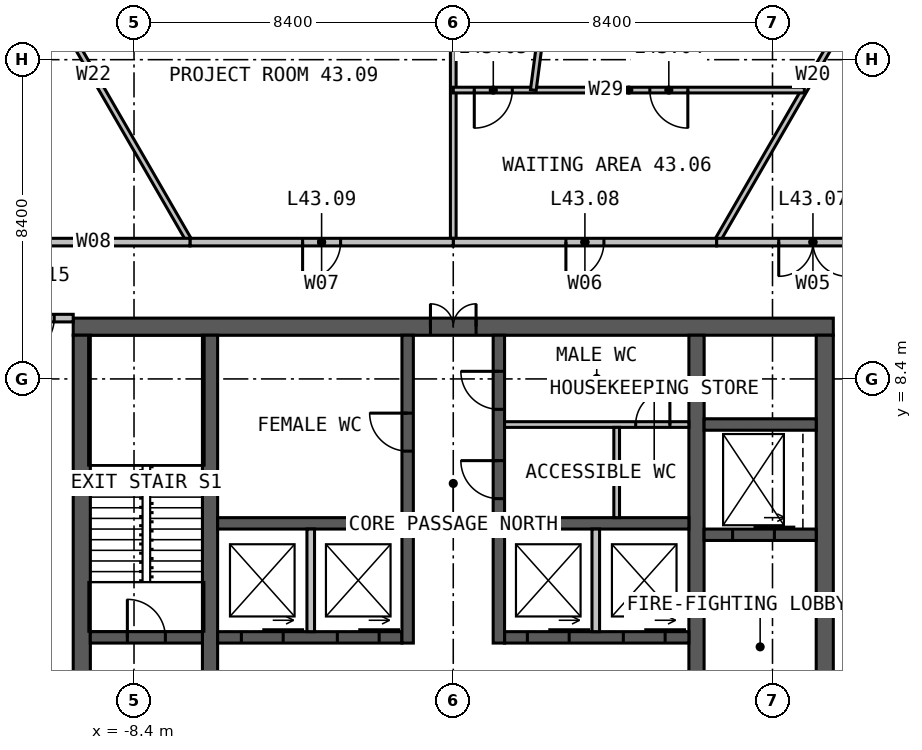
"""IFC4 building model, lengths in metres.
Left out: names, types, materials, properties, quantities, classifications, styles, units other than length and angle.
Written with IfcOpenShell. Run it as: python <this file> out.ifc"""

import sys

from ifc_helpers import new_model, si_unit, direction, frame, frame_2d, origin, place, context, subcontext, project, spatial, rectangle, extrude, element, fill, save


model = new_model("IFC4")
c1 = context("Model", 3, precision=1e-05, world=origin(), true_north=direction((0.0, 1.0)))
c2 = subcontext(c1, "Body", "Model", "MODEL_VIEW")
j1 = project(units=[si_unit("LENGTHUNIT", "METRE"), si_unit("PLANEANGLEUNIT", "RADIAN")], contexts=[c1])
p1 = place(None, origin())
s1 = spatial("IfcSite", under=j1, at=p1, CompositionType="ELEMENT")
p2 = place(p1, origin())
s2 = spatial("IfcBuilding", under=s1, at=p2, CompositionType="ELEMENT")
p3 = place(p2, frame((0.0, 0.0, 179.0)))
s3 = spatial("IfcBuildingStorey", under=s2, at=p3, CompositionType="ELEMENT", Elevation=179.0)
p4 = place(p3, frame((-10.0, 9.775, 0.0), z_axis=(0.0, 0.0, 1.0), x_axis=(1.0, 0.0, 0.0)))
e1 = element("IfcWall", 1, at=p4, inside=s3, PredefinedType="SOLIDWALL", context=c2, shape_type="SweptSolid", body=[
    extrude(rectangle(XDim=20.0, YDim=0.45, at=frame_2d((10.0, 0.0))), origin(), (0.0, 0.0, 1.0), 4.0),
])
p5 = place(p4, frame((9.4, 0.0, 0.0)))
e2 = element("IfcOpeningElement", 2, at=p5, cuts=e1, PredefinedType="OPENING", context=c2, shape_type="SweptSolid", body=[
    extrude(rectangle(XDim=1.2, YDim=2.2, at=frame_2d((0.6, 1.1))), frame((0.0, 0.235, 0.0), z_axis=(0.0, -1.0, 0.0), x_axis=(1.0, 0.0, 0.0)), (0.0, 0.0, 1.0), 0.47),
])
for number, where, z_axis, x_axis in (
    (3, (9.775, -9.55, 0.0), (0.0, 0.0, 1.0), (0.0, 1.0, 0.0)),
    (4, (-9.775, 9.55, 0.0), (0.0, 0.0, 1.0), (0.0, -1.0, 0.0)),
):
    element("IfcWall", number, at=place(p3, frame(where, z_axis=z_axis, x_axis=x_axis)), inside=s3, PredefinedType="SOLIDWALL", context=c2, shape_type="SweptSolid", body=[
        extrude(rectangle(XDim=19.1, YDim=0.45, at=frame_2d((9.55, 0.0))), origin(), (0.0, 0.0, 1.0), 4.0),
    ])
p6 = place(p3, frame((-6.4, -9.55, 0.0), z_axis=(0.0, 0.0, 1.0), x_axis=(0.0, 1.0, 0.0)))
e5 = element("IfcWall", 5, at=p6, inside=s3, PredefinedType="SOLIDWALL", context=c2, shape_type="SweptSolid", body=[
    extrude(rectangle(XDim=19.1, YDim=0.4, at=frame_2d((9.55, 0.0))), origin(), (0.0, 0.0, 1.0), 4.0),
])
p7 = place(p6, frame((9.05, 0.0, 0.0)))
e6 = element("IfcOpeningElement", 6, at=p7, cuts=e5, PredefinedType="OPENING", context=c2, shape_type="SweptSolid", body=[
    extrude(rectangle(XDim=1.0, YDim=2.2, at=frame_2d((0.5, 1.1))), frame((0.0, 0.21, 0.0), z_axis=(0.0, -1.0, 0.0), x_axis=(1.0, 0.0, 0.0)), (0.0, 0.0, 1.0), 0.42),
])
p8 = place(p3, frame((6.4, 9.55, 0.0), z_axis=(0.0, 0.0, 1.0), x_axis=(0.0, -1.0, 0.0)))
e7 = element("IfcWall", 7, at=p8, inside=s3, PredefinedType="SOLIDWALL", context=c2, shape_type="SweptSolid", body=[
    extrude(rectangle(XDim=19.1, YDim=0.4, at=frame_2d((9.55, 0.0))), origin(), (0.0, 0.0, 1.0), 4.0),
])
p9 = place(p8, frame((9.05, 0.0, 0.0)))
e8 = element("IfcOpeningElement", 8, at=p9, cuts=e7, PredefinedType="OPENING", context=c2, shape_type="SweptSolid", body=[
    extrude(rectangle(XDim=1.0, YDim=2.2, at=frame_2d((0.5, 1.1))), frame((0.0, 0.21, 0.0), z_axis=(0.0, -1.0, 0.0), x_axis=(1.0, 0.0, 0.0)), (0.0, 0.0, 1.0), 0.42),
])
p10 = place(p3, frame((-6.2, 1.6, 0.0), z_axis=(0.0, 0.0, 1.0), x_axis=(1.0, 0.0, 0.0)))
e9 = element("IfcWall", 9, at=p10, inside=s3, PredefinedType="SOLIDWALL", context=c2, shape_type="SweptSolid", body=[
    extrude(rectangle(XDim=4.85, YDim=0.3, at=frame_2d((2.425, 0.0))), origin(), (0.0, 0.0, 1.0), 4.0),
])
p11 = place(p10, frame((0.625, 0.0, 0.0)))
e10 = element("IfcOpeningElement", 10, at=p11, cuts=e9, PredefinedType="OPENING", context=c2, shape_type="SweptSolid", body=[
    extrude(rectangle(XDim=1.1, YDim=2.2, at=frame_2d((0.55, 1.1))), frame((0.0, 0.16, 0.0), z_axis=(0.0, -1.0, 0.0), x_axis=(1.0, 0.0, 0.0)), (0.0, 0.0, 1.0), 0.32),
])
p12 = place(p10, frame((3.15, 0.0, 0.0)))
e11 = element("IfcOpeningElement", 11, at=p12, cuts=e9, PredefinedType="OPENING", context=c2, shape_type="SweptSolid", body=[
    extrude(rectangle(XDim=1.1, YDim=2.2, at=frame_2d((0.55, 1.1))), frame((0.0, 0.16, 0.0), z_axis=(0.0, -1.0, 0.0), x_axis=(1.0, 0.0, 0.0)), (0.0, 0.0, 1.0), 0.32),
])
p13 = place(p3, frame((1.35, 1.6, 0.0), z_axis=(0.0, 0.0, 1.0), x_axis=(1.0, 0.0, 0.0)))
e12 = element("IfcWall", 12, at=p13, inside=s3, PredefinedType="SOLIDWALL", context=c2, shape_type="SweptSolid", body=[
    extrude(rectangle(XDim=4.85, YDim=0.3, at=frame_2d((2.425, 0.0))), origin(), (0.0, 0.0, 1.0), 4.0),
])
p14 = place(p13, frame((0.6, 0.0, 0.0)))
e13 = element("IfcOpeningElement", 13, at=p14, cuts=e12, PredefinedType="OPENING", context=c2, shape_type="SweptSolid", body=[
    extrude(rectangle(XDim=1.1, YDim=2.2, at=frame_2d((0.55, 1.1))), frame((0.0, 0.16, 0.0), z_axis=(0.0, -1.0, 0.0), x_axis=(1.0, 0.0, 0.0)), (0.0, 0.0, 1.0), 0.32),
])
p15 = place(p13, frame((3.125, 0.0, 0.0)))
e14 = element("IfcOpeningElement", 14, at=p15, cuts=e12, PredefinedType="OPENING", context=c2, shape_type="SweptSolid", body=[
    extrude(rectangle(XDim=1.1, YDim=2.2, at=frame_2d((0.55, 1.1))), frame((0.0, 0.16, 0.0), z_axis=(0.0, -1.0, 0.0), x_axis=(1.0, 0.0, 0.0)), (0.0, 0.0, 1.0), 0.32),
])
for number, where, z_axis, x_axis in (
    (15, (-6.2, 4.6, 0.0), (0.0, 0.0, 1.0), (1.0, 0.0, 0.0)),
    (16, (1.35, 4.6, 0.0), (0.0, 0.0, 1.0), (1.0, 0.0, 0.0)),
):
    element("IfcWall", number, at=place(p3, frame(where, z_axis=z_axis, x_axis=x_axis)), inside=s3, PredefinedType="SOLIDWALL", context=c2, shape_type="SweptSolid", body=[
        extrude(rectangle(XDim=4.85, YDim=0.3, at=frame_2d((2.425, 0.0))), origin(), (0.0, 0.0, 1.0), 4.0),
    ])
p16 = place(p3, frame((-1.2, 1.45, 0.0), z_axis=(0.0, 0.0, 1.0), x_axis=(0.0, 1.0, 0.0)))
e17 = element("IfcWall", 17, at=p16, inside=s3, PredefinedType="SOLIDWALL", context=c2, shape_type="SweptSolid", body=[
    extrude(rectangle(XDim=8.1, YDim=0.3, at=frame_2d((4.05, 0.0))), origin(), (0.0, 0.0, 1.0), 4.0),
])
p17 = place(p16, frame((5.05, 0.0, 0.0)))
e18 = element("IfcOpeningElement", 18, at=p17, cuts=e17, PredefinedType="OPENING", context=c2, shape_type="SweptSolid", body=[
    extrude(rectangle(XDim=1.0, YDim=2.2, at=frame_2d((0.5, 1.1))), frame((0.0, 0.16, 0.0), z_axis=(0.0, -1.0, 0.0), x_axis=(1.0, 0.0, 0.0)), (0.0, 0.0, 1.0), 0.32),
])
p18 = place(p3, frame((1.2, 1.45, 0.0), z_axis=(0.0, 0.0, 1.0), x_axis=(0.0, 1.0, 0.0)))
e19 = element("IfcWall", 19, at=p18, inside=s3, PredefinedType="SOLIDWALL", context=c2, shape_type="SweptSolid", body=[
    extrude(rectangle(XDim=8.1, YDim=0.3, at=frame_2d((4.05, 0.0))), origin(), (0.0, 0.0, 1.0), 4.0),
])
p19 = place(p18, frame((3.8, 0.0, 0.0)))
e20 = element("IfcOpeningElement", 20, at=p19, cuts=e19, PredefinedType="OPENING", context=c2, shape_type="SweptSolid", body=[
    extrude(rectangle(XDim=1.0, YDim=2.2, at=frame_2d((0.5, 1.1))), frame((0.0, 0.16, 0.0), z_axis=(0.0, -1.0, 0.0), x_axis=(1.0, 0.0, 0.0)), (0.0, 0.0, 1.0), 0.32),
])
p20 = place(p18, frame((6.15, 0.0, 0.0)))
e21 = element("IfcOpeningElement", 21, at=p20, cuts=e19, PredefinedType="OPENING", context=c2, shape_type="SweptSolid", body=[
    extrude(rectangle(XDim=1.0, YDim=2.2, at=frame_2d((0.5, 1.1))), frame((0.0, 0.16, 0.0), z_axis=(0.0, -1.0, 0.0), x_axis=(1.0, 0.0, 0.0)), (0.0, 0.0, 1.0), 0.32),
])
p21 = place(p3, frame((-9.55, 1.6, 0.0), z_axis=(0.0, 0.0, 1.0), x_axis=(1.0, 0.0, 0.0)))
e22 = element("IfcWall", 22, at=p21, inside=s3, PredefinedType="SOLIDWALL", context=c2, shape_type="SweptSolid", body=[
    extrude(rectangle(XDim=2.95, YDim=0.3, at=frame_2d((1.475, 0.0))), origin(), (0.0, 0.0, 1.0), 4.0),
])
p22 = place(p21, frame((0.975, 0.0, 0.0)))
e23 = element("IfcOpeningElement", 23, at=p22, cuts=e22, PredefinedType="OPENING", context=c2, shape_type="SweptSolid", body=[
    extrude(rectangle(XDim=1.0, YDim=2.2, at=frame_2d((0.5, 1.1))), frame((0.0, 0.16, 0.0), z_axis=(0.0, -1.0, 0.0), x_axis=(1.0, 0.0, 0.0)), (0.0, 0.0, 1.0), 0.32),
])
p23 = place(p3, frame((6.6, 4.3, 0.0), z_axis=(0.0, 0.0, 1.0), x_axis=(1.0, 0.0, 0.0)))
e24 = element("IfcWall", 24, at=p23, inside=s3, PredefinedType="SOLIDWALL", context=c2, shape_type="SweptSolid", body=[
    extrude(rectangle(XDim=2.95, YDim=0.3, at=frame_2d((1.475, 0.0))), origin(), (0.0, 0.0, 1.0), 4.0),
])
p24 = place(p23, frame((0.75, 0.0, 0.0)))
e25 = element("IfcOpeningElement", 25, at=p24, cuts=e24, PredefinedType="OPENING", context=c2, shape_type="SweptSolid", body=[
    extrude(rectangle(XDim=1.1, YDim=2.2, at=frame_2d((0.55, 1.1))), frame((0.0, 0.16, 0.0), z_axis=(0.0, -1.0, 0.0), x_axis=(1.0, 0.0, 0.0)), (0.0, 0.0, 1.0), 0.32),
])
p25 = place(p3, frame((6.6, 7.2, 0.0), z_axis=(0.0, 0.0, 1.0), x_axis=(1.0, 0.0, 0.0)))
e26 = element("IfcWall", 26, at=p25, inside=s3, PredefinedType="SOLIDWALL", context=c2, shape_type="SweptSolid", body=[
    extrude(rectangle(XDim=2.95, YDim=0.3, at=frame_2d((1.475, 0.0))), origin(), (0.0, 0.0, 1.0), 4.0),
])
for number, where, z_axis, x_axis in (
    (27, (-3.75, 1.75, 0.0), (0.0, 0.0, 1.0), (0.0, 1.0, 0.0)),
    (28, (3.75, 1.75, 0.0), (0.0, 0.0, 1.0), (0.0, 1.0, 0.0)),
):
    element("IfcWall", number, at=place(p3, frame(where, z_axis=z_axis, x_axis=x_axis)), inside=s3, PredefinedType="SOLIDWALL", context=c2, shape_type="SweptSolid", body=[
        extrude(rectangle(XDim=2.7, YDim=0.2, at=frame_2d((1.35, 0.0))), origin(), (0.0, 0.0, 1.0), 3.75),
    ])
p26 = place(p3, frame((1.35, 7.2, 0.0), z_axis=(0.0, 0.0, 1.0), x_axis=(1.0, 0.0, 0.0)))
e29 = element("IfcWall", 29, at=p26, inside=s3, PredefinedType="PARTITIONING", context=c2, shape_type="SweptSolid", body=[
    extrude(rectangle(XDim=4.85, YDim=0.15, at=frame_2d((2.425, 0.0))), origin(), (0.0, 0.0, 1.0), 3.75),
])
p27 = place(p26, frame((3.45, 0.0, 0.0)))
e30 = element("IfcOpeningElement", 30, at=p27, cuts=e29, PredefinedType="OPENING", context=c2, shape_type="SweptSolid", body=[
    extrude(rectangle(XDim=0.9, YDim=2.2, at=frame_2d((0.45, 1.1))), frame((0.0, 0.085, 0.0), z_axis=(0.0, -1.0, 0.0), x_axis=(1.0, 0.0, 0.0)), (0.0, 0.0, 1.0), 0.17),
])
p28 = place(p3, frame((4.3, 4.75, 0.0), z_axis=(0.0, 0.0, 1.0), x_axis=(0.0, 1.0, 0.0)))
e31 = element("IfcWall", 31, at=p28, inside=s3, PredefinedType="PARTITIONING", context=c2, shape_type="SweptSolid", body=[
    extrude(rectangle(XDim=2.375, YDim=0.15, at=frame_2d((1.188, 0.0))), origin(), (0.0, 0.0, 1.0), 3.75),
])
p29 = place(p3, frame((6.928, 12.0, 0.0), z_axis=(0.0, 0.0, 1.0), x_axis=(0.49999906822, 0.866025941747, 0.0)))
e32 = element("IfcWall", 32, at=p29, inside=s3, PredefinedType="PARTITIONING", context=c2, shape_type="SweptSolid", body=[
    extrude(rectangle(XDim=10.136, YDim=0.15, at=frame_2d((5.068, 0.0))), origin(), (0.0, 0.0, 1.0), 2.79),
])
p30 = place(p3, frame((0.0, 12.0, 0.0), z_axis=(0.0, 0.0, 1.0), x_axis=(0.0, 1.0, 0.0)))
e33 = element("IfcWall", 33, at=p30, inside=s3, PredefinedType="PARTITIONING", context=c2, shape_type="SweptSolid", body=[
    extrude(rectangle(XDim=11.992, YDim=0.15, at=frame_2d((5.996, 0.0))), origin(), (0.0, 0.0, 1.0), 2.79),
])
p31 = place(p3, frame((-6.928, 12.0, 0.0), z_axis=(0.0, 0.0, 1.0), x_axis=(-0.49999906822, 0.866025941747, 0.0)))
e34 = element("IfcWall", 34, at=p31, inside=s3, PredefinedType="PARTITIONING", context=c2, shape_type="SweptSolid", body=[
    extrude(rectangle(XDim=10.136, YDim=0.15, at=frame_2d((5.068, 0.0))), origin(), (0.0, 0.0, 1.0), 2.79),
])
p32 = place(p3, frame((12.0, 12.0, 0.0), z_axis=(0.0, 0.0, 1.0), x_axis=(-1.0, 0.0, 0.0)))
e35 = element("IfcWall", 35, at=p32, inside=s3, PredefinedType="PARTITIONING", context=c2, shape_type="SweptSolid", body=[
    extrude(rectangle(XDim=5.072, YDim=0.2, at=frame_2d((2.536, 0.0))), origin(), (0.0, 0.0, 1.0), 3.8),
])
p33 = place(p32, frame((1.636, 0.0, 0.0)))
e36 = element("IfcOpeningElement", 36, at=p33, cuts=e35, PredefinedType="OPENING", context=c2, shape_type="SweptSolid", body=[
    extrude(rectangle(XDim=1.8, YDim=2.2, at=frame_2d((0.9, 1.1))), frame((0.0, 0.11, 0.0), z_axis=(0.0, -1.0, 0.0), x_axis=(1.0, 0.0, 0.0)), (0.0, 0.0, 1.0), 0.22),
])
p34 = place(p3, frame((9.238, 16.0, 0.0), z_axis=(0.0, 0.0, 1.0), x_axis=(-1.0, 0.0, 0.0)))
e37 = element("IfcWall", 37, at=p34, inside=s3, PredefinedType="PARTITIONING", context=c2, shape_type="SweptSolid", body=[
    extrude(rectangle(XDim=9.238, YDim=0.15, at=frame_2d((4.619, 0.0))), origin(), (0.0, 0.0, 1.0), 2.79),
])
p35 = place(p34, frame((3.066, 0.0, 0.0)))
e38 = element("IfcOpeningElement", 38, at=p35, cuts=e37, PredefinedType="OPENING", context=c2, shape_type="SweptSolid", body=[
    extrude(rectangle(XDim=1.0, YDim=2.2, at=frame_2d((0.5, 1.1))), frame((0.0, 0.085, 0.0), z_axis=(0.0, -1.0, 0.0), x_axis=(1.0, 0.0, 0.0)), (0.0, 0.0, 1.0), 0.17),
])
p36 = place(p34, frame((7.684, 0.0, 0.0)))
e39 = element("IfcOpeningElement", 39, at=p36, cuts=e37, PredefinedType="OPENING", context=c2, shape_type="SweptSolid", body=[
    extrude(rectangle(XDim=1.0, YDim=2.2, at=frame_2d((0.5, 1.1))), frame((0.0, 0.085, 0.0), z_axis=(0.0, -1.0, 0.0), x_axis=(1.0, 0.0, 0.0)), (0.0, 0.0, 1.0), 0.17),
])
p37 = place(p3, frame((2.106, 16.0, 0.0), z_axis=(0.0, 0.0, 1.0), x_axis=(0.130513959913, 0.991446471711, 0.0)))
e40 = element("IfcWall", 40, at=p37, inside=s3, PredefinedType="PARTITIONING", context=c2, shape_type="SweptSolid", body=[
    extrude(rectangle(XDim=7.649, YDim=0.15, at=frame_2d((3.824, 0.0))), origin(), (0.0, 0.0, 1.0), 2.79),
])
p38 = place(p3, frame((6.928, 12.0, 0.0), z_axis=(0.0, 0.0, 1.0), x_axis=(-1.0, 0.0, 0.0)))
e41 = element("IfcWall", 41, at=p38, inside=s3, PredefinedType="PARTITIONING", context=c2, shape_type="SweptSolid", body=[
    extrude(rectangle(XDim=6.928, YDim=0.2, at=frame_2d((3.464, 0.0))), origin(), (0.0, 0.0, 1.0), 3.8),
])
p39 = place(p38, frame((2.964, 0.0, 0.0)))
e42 = element("IfcOpeningElement", 42, at=p39, cuts=e41, PredefinedType="OPENING", context=c2, shape_type="SweptSolid", body=[
    extrude(rectangle(XDim=1.0, YDim=2.2, at=frame_2d((0.5, 1.1))), frame((0.0, 0.11, 0.0), z_axis=(0.0, -1.0, 0.0), x_axis=(1.0, 0.0, 0.0)), (0.0, 0.0, 1.0), 0.22),
])
p40 = place(p3, frame((0.0, 12.0, 0.0), z_axis=(0.0, 0.0, 1.0), x_axis=(-1.0, 0.0, 0.0)))
e43 = element("IfcWall", 43, at=p40, inside=s3, PredefinedType="PARTITIONING", context=c2, shape_type="SweptSolid", body=[
    extrude(rectangle(XDim=6.928, YDim=0.2, at=frame_2d((3.464, 0.0))), origin(), (0.0, 0.0, 1.0), 3.8),
])
p41 = place(p40, frame((2.964, 0.0, 0.0)))
e44 = element("IfcOpeningElement", 44, at=p41, cuts=e43, PredefinedType="OPENING", context=c2, shape_type="SweptSolid", body=[
    extrude(rectangle(XDim=1.0, YDim=2.2, at=frame_2d((0.5, 1.1))), frame((0.0, 0.11, 0.0), z_axis=(0.0, -1.0, 0.0), x_axis=(1.0, 0.0, 0.0)), (0.0, 0.0, 1.0), 0.22),
])
p42 = place(p3, frame((-6.928, 12.0, 0.0), z_axis=(0.0, 0.0, 1.0), x_axis=(-1.0, 0.0, 0.0)))
e45 = element("IfcWall", 45, at=p42, inside=s3, PredefinedType="PARTITIONING", context=c2, shape_type="SweptSolid", body=[
    extrude(rectangle(XDim=5.072, YDim=0.2, at=frame_2d((2.536, 0.0))), origin(), (0.0, 0.0, 1.0), 3.8),
])
p43 = place(p3, frame((-10.0, 10.0, 0.0), z_axis=(0.0, 0.0, 1.0), x_axis=(-1.0, 0.0, 0.0)))
e46 = element("IfcWall", 46, at=p43, inside=s3, PredefinedType="PARTITIONING", context=c2, shape_type="SweptSolid", body=[
    extrude(rectangle(XDim=2.0, YDim=0.2, at=frame_2d((1.0, 0.0))), origin(), (0.0, 0.0, 1.0), 3.8),
])
p44 = place(p43, frame((0.5, 0.0, 0.0)))
e47 = element("IfcOpeningElement", 47, at=p44, cuts=e46, PredefinedType="OPENING", context=c2, shape_type="SweptSolid", body=[
    extrude(rectangle(XDim=1.0, YDim=2.2, at=frame_2d((0.5, 1.1))), frame((0.0, 0.11, 0.0), z_axis=(0.0, -1.0, 0.0), x_axis=(1.0, 0.0, 0.0)), (0.0, 0.0, 1.0), 0.22),
])
p45 = place(p5, origin())
e48 = element("IfcDoor", 48, at=p45, inside=s3, OperationType="DOUBLE_DOOR_SINGLE_SWING", PredefinedType="DOOR", context=c2, shape_type="SweptSolid", body=[
    extrude(rectangle(XDim=1.2, YDim=2.2, at=frame_2d((0.6, 1.1))), frame((0.0, 0.025, 0.0), z_axis=(0.0, -1.0, 0.0), x_axis=(1.0, 0.0, 0.0)), (0.0, 0.0, 1.0), 0.05),
])
fill(e2, e48)
p46 = place(p22, origin())
e49 = element("IfcDoor", 49, at=p46, inside=s3, OperationType="SINGLE_SWING_LEFT", PredefinedType="DOOR", context=c2, shape_type="SweptSolid", body=[
    extrude(rectangle(XDim=1.0, YDim=2.2, at=frame_2d((0.5, 1.1))), frame((0.0, 0.025, 0.0), z_axis=(0.0, -1.0, 0.0), x_axis=(1.0, 0.0, 0.0)), (0.0, 0.0, 1.0), 0.05),
])
fill(e23, e49)
p47 = place(p17, origin())
e50 = element("IfcDoor", 50, at=p47, inside=s3, OperationType="SINGLE_SWING_RIGHT", PredefinedType="DOOR", context=c2, shape_type="SweptSolid", body=[
    extrude(rectangle(XDim=1.0, YDim=2.2, at=frame_2d((0.5, 1.1))), frame((0.0, 0.025, 0.0), z_axis=(0.0, -1.0, 0.0), x_axis=(1.0, 0.0, 0.0)), (0.0, 0.0, 1.0), 0.05),
])
fill(e18, e50)
p48 = place(p19, origin())
e51 = element("IfcDoor", 51, at=p48, inside=s3, OperationType="SINGLE_SWING_RIGHT", PredefinedType="DOOR", context=c2, shape_type="SweptSolid", body=[
    extrude(rectangle(XDim=1.0, YDim=2.2, at=frame_2d((0.5, 1.1))), frame((0.0, 0.025, 0.0), z_axis=(0.0, -1.0, 0.0), x_axis=(1.0, 0.0, 0.0)), (0.0, 0.0, 1.0), 0.05),
])
fill(e20, e51)
p49 = place(p20, origin())
e52 = element("IfcDoor", 52, at=p49, inside=s3, OperationType="SINGLE_SWING_RIGHT", PredefinedType="DOOR", context=c2, shape_type="SweptSolid", body=[
    extrude(rectangle(XDim=1.0, YDim=2.2, at=frame_2d((0.5, 1.1))), frame((0.0, 0.025, 0.0), z_axis=(0.0, -1.0, 0.0), x_axis=(1.0, 0.0, 0.0)), (0.0, 0.0, 1.0), 0.05),
])
fill(e21, e52)
p50 = place(p27, origin())
e53 = element("IfcDoor", 53, at=p50, inside=s3, OperationType="SINGLE_SWING_RIGHT", PredefinedType="DOOR", context=c2, shape_type="SweptSolid", body=[
    extrude(rectangle(XDim=0.9, YDim=2.2, at=frame_2d((0.45, 1.1))), frame((0.0, 0.025, 0.0), z_axis=(0.0, -1.0, 0.0), x_axis=(1.0, 0.0, 0.0)), (0.0, 0.0, 1.0), 0.05),
])
fill(e30, e53)
p51 = place(p11, origin())
e54 = element("IfcDoor", 54, at=p51, inside=s3, OperationType="SLIDING_TO_LEFT", PredefinedType="DOOR", context=c2, shape_type="SweptSolid", body=[
    extrude(rectangle(XDim=1.1, YDim=2.2, at=frame_2d((0.55, 1.1))), frame((0.0, 0.025, 0.0), z_axis=(0.0, -1.0, 0.0), x_axis=(1.0, 0.0, 0.0)), (0.0, 0.0, 1.0), 0.05),
])
fill(e10, e54)
p52 = place(p12, origin())
e55 = element("IfcDoor", 55, at=p52, inside=s3, OperationType="SLIDING_TO_LEFT", PredefinedType="DOOR", context=c2, shape_type="SweptSolid", body=[
    extrude(rectangle(XDim=1.1, YDim=2.2, at=frame_2d((0.55, 1.1))), frame((0.0, 0.025, 0.0), z_axis=(0.0, -1.0, 0.0), x_axis=(1.0, 0.0, 0.0)), (0.0, 0.0, 1.0), 0.05),
])
fill(e11, e55)
p53 = place(p14, origin())
e56 = element("IfcDoor", 56, at=p53, inside=s3, OperationType="SLIDING_TO_LEFT", PredefinedType="DOOR", context=c2, shape_type="SweptSolid", body=[
    extrude(rectangle(XDim=1.1, YDim=2.2, at=frame_2d((0.55, 1.1))), frame((0.0, 0.025, 0.0), z_axis=(0.0, -1.0, 0.0), x_axis=(1.0, 0.0, 0.0)), (0.0, 0.0, 1.0), 0.05),
])
fill(e13, e56)
p54 = place(p15, origin())
e57 = element("IfcDoor", 57, at=p54, inside=s3, OperationType="SLIDING_TO_LEFT", PredefinedType="DOOR", context=c2, shape_type="SweptSolid", body=[
    extrude(rectangle(XDim=1.1, YDim=2.2, at=frame_2d((0.55, 1.1))), frame((0.0, 0.025, 0.0), z_axis=(0.0, -1.0, 0.0), x_axis=(1.0, 0.0, 0.0)), (0.0, 0.0, 1.0), 0.05),
])
fill(e14, e57)
p55 = place(p24, origin())
e58 = element("IfcDoor", 58, at=p55, inside=s3, OperationType="SLIDING_TO_LEFT", PredefinedType="DOOR", context=c2, shape_type="SweptSolid", body=[
    extrude(rectangle(XDim=1.1, YDim=2.2, at=frame_2d((0.55, 1.1))), frame((0.0, 0.025, 0.0), z_axis=(0.0, -1.0, 0.0), x_axis=(1.0, 0.0, 0.0)), (0.0, 0.0, 1.0), 0.05),
])
fill(e25, e58)
p56 = place(p33, origin())
e59 = element("IfcDoor", 59, at=p56, inside=s3, OperationType="DOUBLE_DOOR_SINGLE_SWING", PredefinedType="DOOR", context=c2, shape_type="SweptSolid", body=[
    extrude(rectangle(XDim=1.8, YDim=2.2, at=frame_2d((0.9, 1.1))), frame((0.0, 0.025, 0.0), z_axis=(0.0, -1.0, 0.0), x_axis=(1.0, 0.0, 0.0)), (0.0, 0.0, 1.0), 0.05),
])
fill(e36, e59)
p57 = place(p35, origin())
e60 = element("IfcDoor", 60, at=p57, inside=s3, OperationType="SINGLE_SWING_LEFT", PredefinedType="DOOR", context=c2, shape_type="SweptSolid", body=[
    extrude(rectangle(XDim=1.0, YDim=2.2, at=frame_2d((0.5, 1.1))), frame((0.0, 0.025, 0.0), z_axis=(0.0, -1.0, 0.0), x_axis=(1.0, 0.0, 0.0)), (0.0, 0.0, 1.0), 0.05),
])
fill(e38, e60)
p58 = place(p36, origin())
e61 = element("IfcDoor", 61, at=p58, inside=s3, OperationType="SINGLE_SWING_RIGHT", PredefinedType="DOOR", context=c2, shape_type="SweptSolid", body=[
    extrude(rectangle(XDim=1.0, YDim=2.2, at=frame_2d((0.5, 1.1))), frame((0.0, 0.025, 0.0), z_axis=(0.0, -1.0, 0.0), x_axis=(1.0, 0.0, 0.0)), (0.0, 0.0, 1.0), 0.05),
])
fill(e39, e61)
p59 = place(p39, origin())
e62 = element("IfcDoor", 62, at=p59, inside=s3, OperationType="SINGLE_SWING_RIGHT", PredefinedType="DOOR", context=c2, shape_type="SweptSolid", body=[
    extrude(rectangle(XDim=1.0, YDim=2.2, at=frame_2d((0.5, 1.1))), frame((0.0, 0.025, 0.0), z_axis=(0.0, -1.0, 0.0), x_axis=(1.0, 0.0, 0.0)), (0.0, 0.0, 1.0), 0.05),
])
fill(e42, e62)
p60 = place(p41, origin())
e63 = element("IfcDoor", 63, at=p60, inside=s3, OperationType="SINGLE_SWING_RIGHT", PredefinedType="DOOR", context=c2, shape_type="SweptSolid", body=[
    extrude(rectangle(XDim=1.0, YDim=2.2, at=frame_2d((0.5, 1.1))), frame((0.0, 0.025, 0.0), z_axis=(0.0, -1.0, 0.0), x_axis=(1.0, 0.0, 0.0)), (0.0, 0.0, 1.0), 0.05),
])
fill(e44, e63)
p61 = place(p44, origin())
e64 = element("IfcDoor", 64, at=p61, inside=s3, OperationType="SINGLE_SWING_RIGHT", PredefinedType="DOOR", context=c2, shape_type="SweptSolid", body=[
    extrude(rectangle(XDim=1.0, YDim=2.2, at=frame_2d((0.5, 1.1))), frame((0.0, 0.025, 0.0), z_axis=(0.0, -1.0, 0.0), x_axis=(1.0, 0.0, 0.0)), (0.0, 0.0, 1.0), 0.05),
])
fill(e47, e64)
save(model, sys.argv[1])
